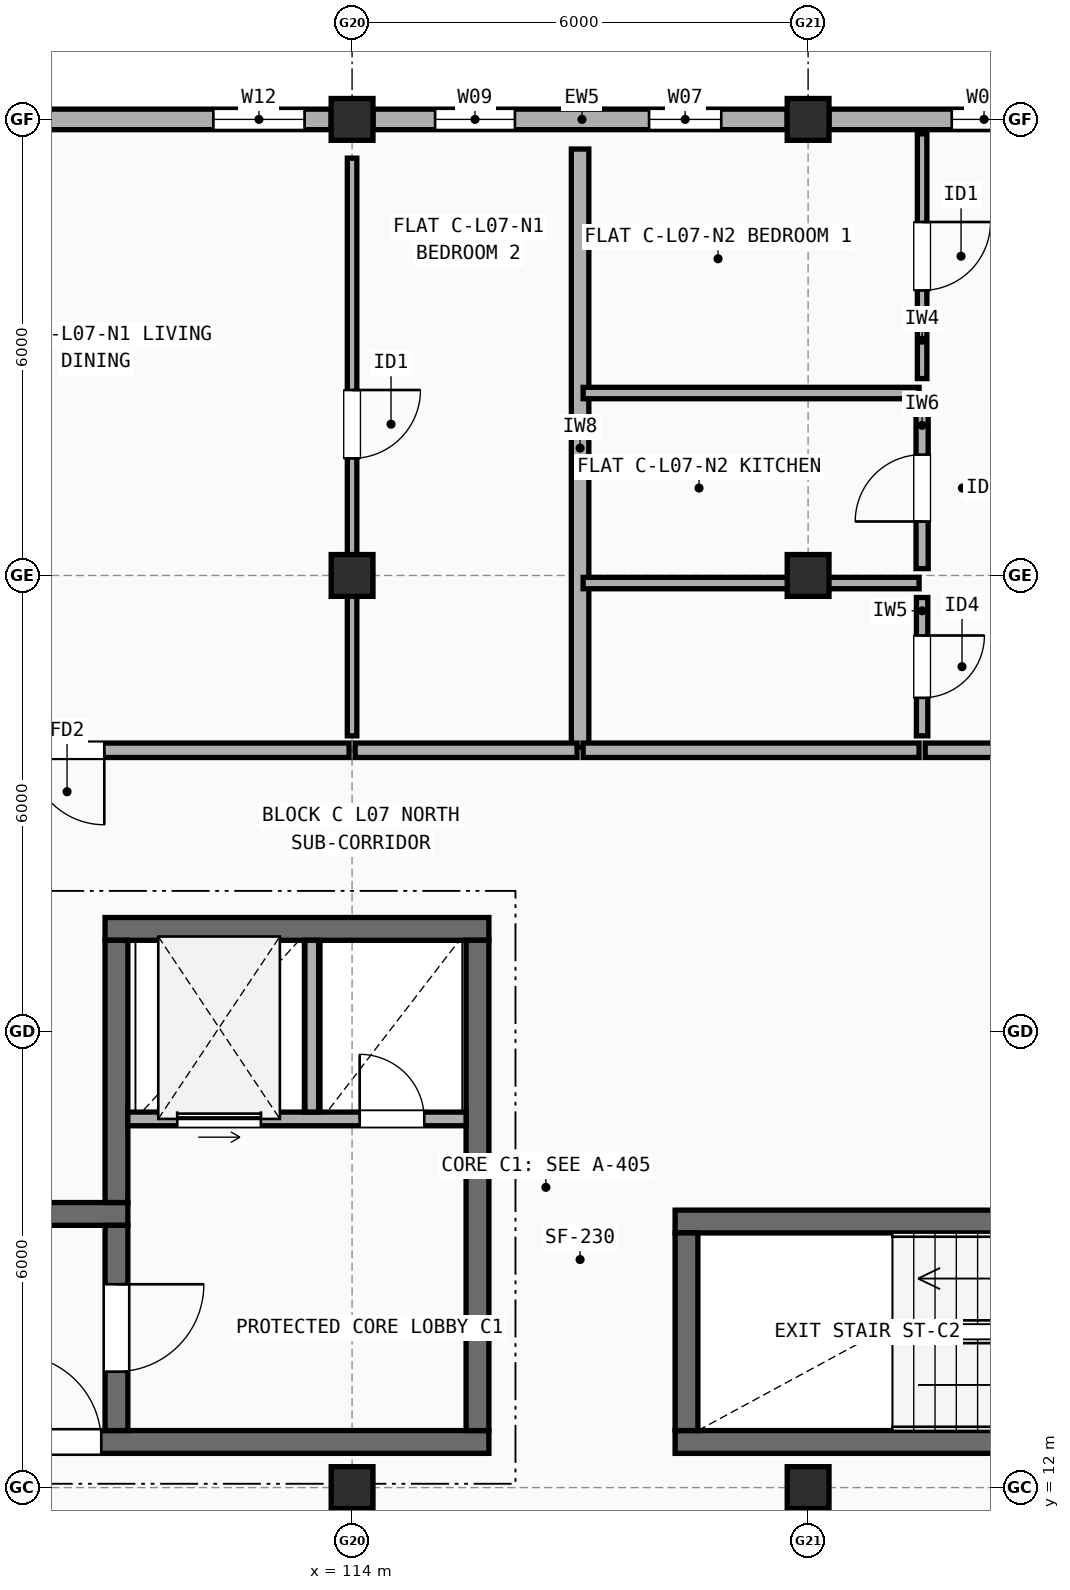
"""IFC4 building model, lengths in metres.
Left out: names, types, materials, properties, quantities, classifications, styles, units other than length and angle.
Written with IfcOpenShell. Run it as: python <this file> out.ifc"""

import sys

from ifc_helpers import new_model, si_unit, direction, frame, frame_2d, origin, origin_2d, place, context, subcontext, project, spatial, rectangle, extrude, element, fill, save


model = new_model("IFC4")
c1 = context("Model", 3, precision=1e-05, world=origin(), true_north=direction((0.0, 1.0)))
c2 = subcontext(c1, "Body", "Model", "MODEL_VIEW")
j1 = project(units=[si_unit("LENGTHUNIT", "METRE"), si_unit("PLANEANGLEUNIT", "RADIAN")], contexts=[c1])
p1 = place(None, origin())
s1 = spatial("IfcSite", under=j1, at=p1, CompositionType="ELEMENT")
p2 = place(p1, origin())
s2 = spatial("IfcBuilding", under=s1, at=p2, CompositionType="ELEMENT")
p3 = place(p2, frame((0.0, 0.0, 23.7)))
s3 = spatial("IfcBuildingStorey", under=s2, at=p3, CompositionType="ELEMENT", Elevation=23.7)
for number, where, z_axis, x_axis in (
    (1, (114.0, 12.0, 0.0), (0.0, 0.0, 1.0), (1.0, 0.0, 0.0)),
    (2, (114.0, 24.0, 0.0), (0.0, 0.0, 1.0), (1.0, 0.0, 0.0)),
    (3, (114.0, 30.0, 0.0), (0.0, 0.0, 1.0), (1.0, 0.0, 0.0)),
    (4, (120.0, 12.0, 0.0), (0.0, 0.0, 1.0), (1.0, 0.0, 0.0)),
    (5, (120.0, 24.0, 0.0), (0.0, 0.0, 1.0), (1.0, 0.0, 0.0)),
    (6, (120.0, 30.0, 0.0), (0.0, 0.0, 1.0), (1.0, 0.0, 0.0)),
):
    element("IfcColumn", number, at=place(p3, frame(where, z_axis=z_axis, x_axis=x_axis)), inside=s3, PredefinedType="COLUMN", context=c2, shape_type="SweptSolid", body=[
        extrude(rectangle(XDim=0.55, YDim=0.55, at=origin_2d()), origin(), (0.0, 0.0, 1.0), 2.975),
    ])
p4 = place(p3, frame((125.725, 30.0, 0.0), z_axis=(0.0, 0.0, 1.0), x_axis=(-1.0, 0.0, 0.0)))
e7 = element("IfcWall", 7, at=p4, inside=s3, PredefinedType="STANDARD", context=c2, shape_type="SweptSolid", body=[
    extrude(rectangle(XDim=5.45, YDim=0.27, at=frame_2d((2.725, 0.0))), origin(), (0.0, 0.0, 1.0), 2.457),
])
p5 = place(p4, frame((0.35, 0.0, 0.9)))
e8 = element("IfcOpeningElement", 8, at=p5, cuts=e7, PredefinedType="OPENING", context=c2, shape_type="SweptSolid", body=[
    extrude(rectangle(XDim=0.85, YDim=1.25, at=frame_2d((0.425, 0.625))), frame((0.0, 0.145, 0.0), z_axis=(0.0, -1.0, 0.0), x_axis=(1.0, 0.0, 0.0)), (0.0, 0.0, 1.0), 0.29),
])
p6 = place(p4, frame((2.985, 0.0, 0.9)))
e9 = element("IfcOpeningElement", 9, at=p6, cuts=e7, PredefinedType="OPENING", context=c2, shape_type="SweptSolid", body=[
    extrude(rectangle(XDim=0.85, YDim=1.25, at=frame_2d((0.425, 0.625))), frame((0.0, 0.145, 0.0), z_axis=(0.0, -1.0, 0.0), x_axis=(1.0, 0.0, 0.0)), (0.0, 0.0, 1.0), 0.29),
])
p7 = place(p3, frame((119.725, 30.0, 0.0), z_axis=(0.0, 0.0, 1.0), x_axis=(-1.0, 0.0, 0.0)))
e10 = element("IfcWall", 10, at=p7, inside=s3, PredefinedType="STANDARD", context=c2, shape_type="SweptSolid", body=[
    extrude(rectangle(XDim=5.45, YDim=0.27, at=frame_2d((2.725, 0.0))), origin(), (0.0, 0.0, 1.0), 2.457),
])
p8 = place(p7, frame((0.867, 0.0, 0.9)))
e11 = element("IfcOpeningElement", 11, at=p8, cuts=e10, PredefinedType="OPENING", context=c2, shape_type="SweptSolid", body=[
    extrude(rectangle(XDim=0.95, YDim=1.35, at=frame_2d((0.475, 0.675))), frame((0.0, 0.145, 0.0), z_axis=(0.0, -1.0, 0.0), x_axis=(1.0, 0.0, 0.0)), (0.0, 0.0, 1.0), 0.29),
])
p9 = place(p7, frame((3.583, 0.0, 0.9)))
e12 = element("IfcOpeningElement", 12, at=p9, cuts=e10, PredefinedType="OPENING", context=c2, shape_type="SweptSolid", body=[
    extrude(rectangle(XDim=1.05, YDim=1.35, at=frame_2d((0.525, 0.675))), frame((0.0, 0.145, 0.0), z_axis=(0.0, -1.0, 0.0), x_axis=(1.0, 0.0, 0.0)), (0.0, 0.0, 1.0), 0.29),
])
p10 = place(p3, frame((113.725, 30.0, 0.0), z_axis=(0.0, 0.0, 1.0), x_axis=(-1.0, 0.0, 0.0)))
e13 = element("IfcWall", 13, at=p10, inside=s3, PredefinedType="STANDARD", context=c2, shape_type="SweptSolid", body=[
    extrude(rectangle(XDim=5.45, YDim=0.27, at=frame_2d((2.725, 0.0))), origin(), (0.0, 0.0, 1.0), 2.457),
])
p11 = place(p10, frame((0.35, 0.0, 0.9)))
e14 = element("IfcOpeningElement", 14, at=p11, cuts=e13, PredefinedType="OPENING", context=c2, shape_type="SweptSolid", body=[
    extrude(rectangle(XDim=1.2, YDim=1.35, at=frame_2d((0.6, 0.675))), frame((0.0, 0.145, 0.0), z_axis=(0.0, -1.0, 0.0), x_axis=(1.0, 0.0, 0.0)), (0.0, 0.0, 1.0), 0.29),
])
p12 = place(p10, frame((3.9, 0.0, 0.9)))
e15 = element("IfcOpeningElement", 15, at=p12, cuts=e13, PredefinedType="OPENING", context=c2, shape_type="SweptSolid", body=[
    extrude(rectangle(XDim=1.2, YDim=1.35, at=frame_2d((0.6, 0.675))), frame((0.0, 0.145, 0.0), z_axis=(0.0, -1.0, 0.0), x_axis=(1.0, 0.0, 0.0)), (0.0, 0.0, 1.0), 0.29),
])
p13 = place(p3, frame((104.45, 12.6, 0.0), z_axis=(0.0, 0.0, 1.0), x_axis=(1.0, 0.0, 0.0)))
e16 = element("IfcWall", 16, at=p13, inside=s3, PredefinedType="SHEAR", context=c2, shape_type="SweptSolid", body=[
    extrude(rectangle(XDim=11.35, YDim=0.3, at=frame_2d((5.675, 0.0))), origin(), (0.0, 0.0, 1.0), 2.975),
])
p14 = place(p13, frame((5.1, 0.0, 0.0)))
e17 = element("IfcOpeningElement", 17, at=p14, cuts=e16, PredefinedType="OPENING", context=c2, shape_type="SweptSolid", body=[
    extrude(rectangle(XDim=1.15, YDim=2.15, at=frame_2d((0.575, 1.075))), frame((0.0, 0.16, 0.0), z_axis=(0.0, -1.0, 0.0), x_axis=(1.0, 0.0, 0.0)), (0.0, 0.0, 1.0), 0.32),
])
p15 = place(p3, frame((111.05, 15.6, 0.0), z_axis=(0.0, 0.0, 1.0), x_axis=(-1.0, 0.0, 0.0)))
e18 = element("IfcWall", 18, at=p15, inside=s3, PredefinedType="SHEAR", context=c2, shape_type="SweptSolid", body=[
    extrude(rectangle(XDim=6.6, YDim=0.3, at=frame_2d((3.3, 0.0))), origin(), (0.0, 0.0, 1.0), 2.975),
])
p16 = place(p3, frame((110.9, 12.75, 0.0), z_axis=(0.0, 0.0, 1.0), x_axis=(0.0, 1.0, 0.0)))
e19 = element("IfcWall", 19, at=p16, inside=s3, PredefinedType="SHEAR", context=c2, shape_type="SweptSolid", body=[
    extrude(rectangle(XDim=2.7, YDim=0.3, at=frame_2d((1.35, 0.0))), origin(), (0.0, 0.0, 1.0), 2.975),
])
p17 = place(p16, frame((0.775, 0.0, 0.0)))
e20 = element("IfcOpeningElement", 20, at=p17, cuts=e19, PredefinedType="OPENING", context=c2, shape_type="SweptSolid", body=[
    extrude(rectangle(XDim=1.15, YDim=2.15, at=frame_2d((0.575, 1.075))), frame((0.0, 0.16, 0.0), z_axis=(0.0, -1.0, 0.0), x_axis=(1.0, 0.0, 0.0)), (0.0, 0.0, 1.0), 0.32),
])
p18 = place(p3, frame((115.8, 19.35, 0.0), z_axis=(0.0, 0.0, 1.0), x_axis=(-1.0, 0.0, 0.0)))
e21 = element("IfcWall", 21, at=p18, inside=s3, PredefinedType="SHEAR", context=c2, shape_type="SweptSolid", body=[
    extrude(rectangle(XDim=5.05, YDim=0.3, at=frame_2d((2.525, 0.0))), origin(), (0.0, 0.0, 1.0), 2.975),
])
p19 = place(p3, frame((115.65, 12.75, 0.0), z_axis=(0.0, 0.0, 1.0), x_axis=(0.0, 1.0, 0.0)))
e22 = element("IfcWall", 22, at=p19, inside=s3, PredefinedType="SHEAR", context=c2, shape_type="SweptSolid", body=[
    extrude(rectangle(XDim=6.45, YDim=0.3, at=frame_2d((3.225, 0.0))), origin(), (0.0, 0.0, 1.0), 2.975),
])
p20 = place(p3, frame((110.9, 15.75, 0.0), z_axis=(0.0, 0.0, 1.0), x_axis=(0.0, 1.0, 0.0)))
e23 = element("IfcWall", 23, at=p20, inside=s3, PredefinedType="SHEAR", context=c2, shape_type="SweptSolid", body=[
    extrude(rectangle(XDim=3.45, YDim=0.3, at=frame_2d((1.725, 0.0))), origin(), (0.0, 0.0, 1.0), 2.975),
])
p21 = place(p3, frame((111.05, 16.85, 0.0), z_axis=(0.0, 0.0, 1.0), x_axis=(1.0, 0.0, 0.0)))
e24 = element("IfcWall", 24, at=p21, inside=s3, PredefinedType="SOLIDWALL", context=c2, shape_type="SweptSolid", body=[
    extrude(rectangle(XDim=4.45, YDim=0.18, at=frame_2d((2.225, 0.0))), origin(), (0.0, 0.0, 1.0), 2.975),
])
p22 = place(p21, frame((0.65, 0.0, 0.0)))
e25 = element("IfcOpeningElement", 25, at=p22, cuts=e24, PredefinedType="OPENING", context=c2, shape_type="SweptSolid", body=[
    extrude(rectangle(XDim=1.1, YDim=2.15, at=frame_2d((0.55, 1.075))), frame((0.0, 0.1, 0.0), z_axis=(0.0, -1.0, 0.0), x_axis=(1.0, 0.0, 0.0)), (0.0, 0.0, 1.0), 0.2),
])
p23 = place(p21, frame((3.05, 0.0, 0.0)))
e26 = element("IfcOpeningElement", 26, at=p23, cuts=e24, PredefinedType="OPENING", context=c2, shape_type="SweptSolid", body=[
    extrude(rectangle(XDim=0.85, YDim=2.1, at=frame_2d((0.425, 1.05))), frame((0.0, 0.1, 0.0), z_axis=(0.0, -1.0, 0.0), x_axis=(1.0, 0.0, 0.0)), (0.0, 0.0, 1.0), 0.2),
])
p24 = place(p3, frame((113.47, 16.94, 0.0), z_axis=(0.0, 0.0, 1.0), x_axis=(0.0, 1.0, 0.0)))
e27 = element("IfcWall", 27, at=p24, inside=s3, PredefinedType="SOLIDWALL", context=c2, shape_type="SweptSolid", body=[
    extrude(rectangle(XDim=2.26, YDim=0.18, at=frame_2d((1.13, 0.0))), origin(), (0.0, 0.0, 1.0), 2.975),
])
p25 = place(p3, frame((118.25, 12.6, 0.0), z_axis=(0.0, 0.0, 1.0), x_axis=(1.0, 0.0, 0.0)))
e28 = element("IfcWall", 28, at=p25, inside=s3, PredefinedType="SHEAR", context=c2, shape_type="SweptSolid", body=[
    extrude(rectangle(XDim=11.35, YDim=0.3, at=frame_2d((5.675, 0.0))), origin(), (0.0, 0.0, 1.0), 2.975),
])
p26 = place(p25, frame((8.1, 0.0, 0.0)))
e29 = element("IfcOpeningElement", 29, at=p26, cuts=e28, PredefinedType="OPENING", context=c2, shape_type="SweptSolid", body=[
    extrude(rectangle(XDim=1.2, YDim=2.15, at=frame_2d((0.6, 1.075))), frame((0.0, 0.16, 0.0), z_axis=(0.0, -1.0, 0.0), x_axis=(1.0, 0.0, 0.0)), (0.0, 0.0, 1.0), 0.32),
])
p27 = place(p3, frame((124.85, 15.5, 0.0), z_axis=(0.0, 0.0, 1.0), x_axis=(-1.0, 0.0, 0.0)))
e30 = element("IfcWall", 30, at=p27, inside=s3, PredefinedType="SHEAR", context=c2, shape_type="SweptSolid", body=[
    extrude(rectangle(XDim=6.6, YDim=0.3, at=frame_2d((3.3, 0.0))), origin(), (0.0, 0.0, 1.0), 2.975),
])
p28 = place(p3, frame((118.4, 15.35, 0.0), z_axis=(0.0, 0.0, 1.0), x_axis=(0.0, -1.0, 0.0)))
e31 = element("IfcWall", 31, at=p28, inside=s3, PredefinedType="SHEAR", context=c2, shape_type="SweptSolid", body=[
    extrude(rectangle(XDim=2.6, YDim=0.3, at=frame_2d((1.3, 0.0))), origin(), (0.0, 0.0, 1.0), 2.975),
])
p29 = place(p3, frame((117.0, 21.74, 0.0), z_axis=(0.0, 0.0, 1.0), x_axis=(0.0, 1.0, 0.0)))
e32 = element("IfcWall", 32, at=p29, inside=s3, PredefinedType="SOLIDWALL", context=c2, shape_type="SweptSolid", body=[
    extrude(rectangle(XDim=7.87, YDim=0.23, at=frame_2d((3.935, 0.0))), origin(), (0.0, 0.0, 1.0), 2.508),
])
p30 = place(p3, frame((106.54, 21.7, 0.0), z_axis=(0.0, 0.0, 1.0), x_axis=(1.0, 0.0, 0.0)))
e33 = element("IfcWall", 33, at=p30, inside=s3, PredefinedType="SOLIDWALL", context=c2, shape_type="SweptSolid", body=[
    extrude(rectangle(XDim=7.42, YDim=0.19, at=frame_2d((3.71, 0.0))), origin(), (0.0, 0.0, 1.0), 2.508),
])
p31 = place(p30, frame((3.22, 0.0, 0.0)))
e34 = element("IfcOpeningElement", 34, at=p31, cuts=e33, PredefinedType="OPENING", context=c2, shape_type="SweptSolid", body=[
    extrude(rectangle(XDim=0.98, YDim=2.15, at=frame_2d((0.49, 1.075))), frame((0.0, 0.105, 0.0), z_axis=(0.0, -1.0, 0.0), x_axis=(1.0, 0.0, 0.0)), (0.0, 0.0, 1.0), 0.21),
])
p32 = place(p3, frame((114.04, 21.7, 0.0), z_axis=(0.0, 0.0, 1.0), x_axis=(1.0, 0.0, 0.0)))
e35 = element("IfcWall", 35, at=p32, inside=s3, PredefinedType="SOLIDWALL", context=c2, shape_type="SweptSolid", body=[
    extrude(rectangle(XDim=2.92, YDim=0.19, at=frame_2d((1.46, 0.0))), origin(), (0.0, 0.0, 1.0), 2.508),
])
p33 = place(p3, frame((114.0, 21.89, 0.0), z_axis=(0.0, 0.0, 1.0), x_axis=(0.0, 1.0, 0.0)))
e36 = element("IfcWall", 36, at=p33, inside=s3, PredefinedType="PARTITIONING", context=c2, shape_type="SweptSolid", body=[
    extrude(rectangle(XDim=7.6, YDim=0.125, at=frame_2d((3.8, 0.0))), origin(), (0.0, 0.0, 1.0), 2.508),
])
p34 = place(p33, frame((3.65, 0.0, 0.0)))
e37 = element("IfcOpeningElement", 37, at=p34, cuts=e36, PredefinedType="OPENING", context=c2, shape_type="SweptSolid", body=[
    extrude(rectangle(XDim=0.9, YDim=2.1, at=frame_2d((0.45, 1.05))), frame((0.0, 0.073, 0.0), z_axis=(0.0, -1.0, 0.0), x_axis=(1.0, 0.0, 0.0)), (0.0, 0.0, 1.0), 0.145),
])
p35 = place(p3, frame((117.04, 21.7, 0.0), z_axis=(0.0, 0.0, 1.0), x_axis=(1.0, 0.0, 0.0)))
e38 = element("IfcWall", 38, at=p35, inside=s3, PredefinedType="SOLIDWALL", context=c2, shape_type="SweptSolid", body=[
    extrude(rectangle(XDim=4.42, YDim=0.19, at=frame_2d((2.21, 0.0))), origin(), (0.0, 0.0, 1.0), 2.975),
])
p36 = place(p3, frame((121.54, 21.7, 0.0), z_axis=(0.0, 0.0, 1.0), x_axis=(1.0, 0.0, 0.0)))
e39 = element("IfcWall", 39, at=p36, inside=s3, PredefinedType="SOLIDWALL", context=c2, shape_type="SweptSolid", body=[
    extrude(rectangle(XDim=7.42, YDim=0.19, at=frame_2d((3.71, 0.0))), origin(), (0.0, 0.0, 1.0), 2.975),
])
p37 = place(p36, frame((3.21, 0.0, 0.0)))
e40 = element("IfcOpeningElement", 40, at=p37, cuts=e39, PredefinedType="OPENING", context=c2, shape_type="SweptSolid", body=[
    extrude(rectangle(XDim=1.0, YDim=2.15, at=frame_2d((0.5, 1.075))), frame((0.0, 0.105, 0.0), z_axis=(0.0, -1.0, 0.0), x_axis=(1.0, 0.0, 0.0)), (0.0, 0.0, 1.0), 0.21),
])
p38 = place(p3, frame((121.5, 26.59, 0.0), z_axis=(0.0, 0.0, 1.0), x_axis=(0.0, 1.0, 0.0)))
e41 = element("IfcWall", 41, at=p38, inside=s3, PredefinedType="PARTITIONING", context=c2, shape_type="SweptSolid", body=[
    extrude(rectangle(XDim=3.22, YDim=0.125, at=frame_2d((1.61, 0.0))), origin(), (0.0, 0.0, 1.0), 2.975),
])
p39 = place(p38, frame((1.16, 0.0, 0.0)))
e42 = element("IfcOpeningElement", 42, at=p39, cuts=e41, PredefinedType="OPENING", context=c2, shape_type="SweptSolid", body=[
    extrude(rectangle(XDim=0.9, YDim=2.1, at=frame_2d((0.45, 1.05))), frame((0.0, 0.073, 0.0), z_axis=(0.0, -1.0, 0.0), x_axis=(1.0, 0.0, 0.0)), (0.0, 0.0, 1.0), 0.145),
])
p40 = place(p3, frame((121.5, 24.09, 0.0), z_axis=(0.0, 0.0, 1.0), x_axis=(0.0, 1.0, 0.0)))
e43 = element("IfcWall", 43, at=p40, inside=s3, PredefinedType="PLUMBINGWALL", context=c2, shape_type="SweptSolid", body=[
    extrude(rectangle(XDim=2.12, YDim=0.16, at=frame_2d((1.06, 0.0))), origin(), (0.0, 0.0, 1.0), 2.408),
])
p41 = place(p40, frame((0.62, 0.0, 0.0)))
e44 = element("IfcOpeningElement", 44, at=p41, cuts=e43, PredefinedType="OPENING", context=c2, shape_type="SweptSolid", body=[
    extrude(rectangle(XDim=0.88, YDim=2.1, at=frame_2d((0.44, 1.05))), frame((0.0, 0.09, 0.0), z_axis=(0.0, -1.0, 0.0), x_axis=(1.0, 0.0, 0.0)), (0.0, 0.0, 1.0), 0.18),
])
p42 = place(p3, frame((121.5, 21.89, 0.0), z_axis=(0.0, 0.0, 1.0), x_axis=(0.0, 1.0, 0.0)))
e45 = element("IfcWall", 45, at=p42, inside=s3, PredefinedType="PARTITIONING", context=c2, shape_type="SweptSolid", body=[
    extrude(rectangle(XDim=1.82, YDim=0.15, at=frame_2d((0.91, 0.0))), origin(), (0.0, 0.0, 1.0), 2.975),
])
p43 = place(p42, frame((0.5, 0.0, 0.0)))
e46 = element("IfcOpeningElement", 46, at=p43, cuts=e45, PredefinedType="OPENING", context=c2, shape_type="SweptSolid", body=[
    extrude(rectangle(XDim=0.82, YDim=2.08, at=frame_2d((0.41, 1.04))), frame((0.0, 0.085, 0.0), z_axis=(0.0, -1.0, 0.0), x_axis=(1.0, 0.0, 0.0)), (0.0, 0.0, 1.0), 0.17),
])
p44 = place(p3, frame((117.04, 26.4, 0.0), z_axis=(0.0, 0.0, 1.0), x_axis=(1.0, 0.0, 0.0)))
e47 = element("IfcWall", 47, at=p44, inside=s3, PredefinedType="PARTITIONING", context=c2, shape_type="SweptSolid", body=[
    extrude(rectangle(XDim=4.42, YDim=0.15, at=frame_2d((2.21, 0.0))), origin(), (0.0, 0.0, 1.0), 2.508),
])
p45 = place(p3, frame((117.04, 23.9, 0.0), z_axis=(0.0, 0.0, 1.0), x_axis=(1.0, 0.0, 0.0)))
e48 = element("IfcWall", 48, at=p45, inside=s3, PredefinedType="PARTITIONING", context=c2, shape_type="SweptSolid", body=[
    extrude(rectangle(XDim=4.42, YDim=0.15, at=frame_2d((2.21, 0.0))), origin(), (0.0, 0.0, 1.0), 2.408),
])
p46 = place(p6, origin())
e49 = element("IfcWindow", 49, at=p46, inside=s3, PartitioningType="SINGLE_PANEL", PredefinedType="WINDOW", context=c2, shape_type="SweptSolid", body=[
    extrude(rectangle(XDim=0.85, YDim=1.25, at=frame_2d((0.425, 0.625))), frame((0.0, 0.03, 0.0), z_axis=(0.0, -1.0, 0.0), x_axis=(1.0, 0.0, 0.0)), (0.0, 0.0, 1.0), 0.06),
])
fill(e9, e49)
p47 = place(p8, origin())
e50 = element("IfcWindow", 50, at=p47, inside=s3, PartitioningType="SINGLE_PANEL", PredefinedType="WINDOW", context=c2, shape_type="SweptSolid", body=[
    extrude(rectangle(XDim=0.95, YDim=1.35, at=frame_2d((0.475, 0.675))), frame((0.0, 0.03, 0.0), z_axis=(0.0, -1.0, 0.0), x_axis=(1.0, 0.0, 0.0)), (0.0, 0.0, 1.0), 0.06),
])
fill(e11, e50)
p48 = place(p9, origin())
e51 = element("IfcWindow", 51, at=p48, inside=s3, PartitioningType="SINGLE_PANEL", PredefinedType="WINDOW", context=c2, shape_type="SweptSolid", body=[
    extrude(rectangle(XDim=1.05, YDim=1.35, at=frame_2d((0.525, 0.675))), frame((0.0, 0.03, 0.0), z_axis=(0.0, -1.0, 0.0), x_axis=(1.0, 0.0, 0.0)), (0.0, 0.0, 1.0), 0.06),
])
fill(e12, e51)
p49 = place(p11, origin())
e52 = element("IfcWindow", 52, at=p49, inside=s3, PartitioningType="SINGLE_PANEL", PredefinedType="WINDOW", context=c2, shape_type="SweptSolid", body=[
    extrude(rectangle(XDim=1.2, YDim=1.35, at=frame_2d((0.6, 0.675))), frame((0.0, 0.03, 0.0), z_axis=(0.0, -1.0, 0.0), x_axis=(1.0, 0.0, 0.0)), (0.0, 0.0, 1.0), 0.06),
])
fill(e14, e52)
p50 = place(p14, origin())
e53 = element("IfcDoor", 53, at=p50, inside=s3, OperationType="SINGLE_SWING_LEFT", PredefinedType="DOOR", context=c2, shape_type="SweptSolid", body=[
    extrude(rectangle(XDim=1.15, YDim=2.15, at=frame_2d((0.575, 1.075))), frame((0.0, 0.025, 0.0), z_axis=(0.0, -1.0, 0.0), x_axis=(1.0, 0.0, 0.0)), (0.0, 0.0, 1.0), 0.05),
])
fill(e17, e53)
p51 = place(p17, origin())
e54 = element("IfcDoor", 54, at=p51, inside=s3, OperationType="SINGLE_SWING_RIGHT", PredefinedType="DOOR", context=c2, shape_type="SweptSolid", body=[
    extrude(rectangle(XDim=1.15, YDim=2.15, at=frame_2d((0.575, 1.075))), frame((0.0, 0.025, 0.0), z_axis=(0.0, -1.0, 0.0), x_axis=(1.0, 0.0, 0.0)), (0.0, 0.0, 1.0), 0.05),
])
fill(e20, e54)
p52 = place(p22, origin())
e55 = element("IfcDoor", 55, at=p52, inside=s3, OperationType="SLIDING_TO_LEFT", PredefinedType="DOOR", context=c2, shape_type="SweptSolid", body=[
    extrude(rectangle(XDim=1.1, YDim=2.15, at=frame_2d((0.55, 1.075))), frame((0.0, 0.025, 0.0), z_axis=(0.0, -1.0, 0.0), x_axis=(1.0, 0.0, 0.0)), (0.0, 0.0, 1.0), 0.05),
])
fill(e25, e55)
p53 = place(p23, frame((0.85, 0.0, 0.0), z_axis=(0.0, 0.0, 1.0), x_axis=(-1.0, 0.0, 0.0)))
e56 = element("IfcDoor", 56, at=p53, inside=s3, OperationType="SINGLE_SWING_LEFT", PredefinedType="DOOR", context=c2, shape_type="SweptSolid", body=[
    extrude(rectangle(XDim=0.85, YDim=2.1, at=frame_2d((0.425, 1.05))), frame((0.0, 0.025, 0.0), z_axis=(0.0, -1.0, 0.0), x_axis=(1.0, 0.0, 0.0)), (0.0, 0.0, 1.0), 0.05),
])
fill(e26, e56)
p54 = place(p31, origin())
e57 = element("IfcDoor", 57, at=p54, inside=s3, OperationType="SINGLE_SWING_RIGHT", PredefinedType="DOOR", context=c2, shape_type="SweptSolid", body=[
    extrude(rectangle(XDim=0.98, YDim=2.15, at=frame_2d((0.49, 1.075))), frame((0.0, 0.025, 0.0), z_axis=(0.0, -1.0, 0.0), x_axis=(1.0, 0.0, 0.0)), (0.0, 0.0, 1.0), 0.05),
])
fill(e34, e57)
p55 = place(p34, origin())
e58 = element("IfcDoor", 58, at=p55, inside=s3, OperationType="SINGLE_SWING_RIGHT", PredefinedType="DOOR", context=c2, shape_type="SweptSolid", body=[
    extrude(rectangle(XDim=0.9, YDim=2.1, at=frame_2d((0.45, 1.05))), frame((0.0, 0.025, 0.0), z_axis=(0.0, -1.0, 0.0), x_axis=(1.0, 0.0, 0.0)), (0.0, 0.0, 1.0), 0.05),
])
fill(e37, e58)
p56 = place(p39, origin())
e59 = element("IfcDoor", 59, at=p56, inside=s3, OperationType="SINGLE_SWING_RIGHT", PredefinedType="DOOR", context=c2, shape_type="SweptSolid", body=[
    extrude(rectangle(XDim=0.9, YDim=2.1, at=frame_2d((0.45, 1.05))), frame((0.0, 0.025, 0.0), z_axis=(0.0, -1.0, 0.0), x_axis=(1.0, 0.0, 0.0)), (0.0, 0.0, 1.0), 0.05),
])
fill(e42, e59)
p57 = place(p41, origin())
e60 = element("IfcDoor", 60, at=p57, inside=s3, OperationType="SINGLE_SWING_LEFT", PredefinedType="DOOR", context=c2, shape_type="SweptSolid", body=[
    extrude(rectangle(XDim=0.88, YDim=2.1, at=frame_2d((0.44, 1.05))), frame((0.0, 0.025, 0.0), z_axis=(0.0, -1.0, 0.0), x_axis=(1.0, 0.0, 0.0)), (0.0, 0.0, 1.0), 0.05),
])
fill(e44, e60)
p58 = place(p43, origin())
e61 = element("IfcDoor", 61, at=p58, inside=s3, OperationType="SINGLE_SWING_RIGHT", PredefinedType="DOOR", context=c2, shape_type="SweptSolid", body=[
    extrude(rectangle(XDim=0.82, YDim=2.08, at=frame_2d((0.41, 1.04))), frame((0.0, 0.025, 0.0), z_axis=(0.0, -1.0, 0.0), x_axis=(1.0, 0.0, 0.0)), (0.0, 0.0, 1.0), 0.05),
])
fill(e46, e61)
save(model, sys.argv[1])
